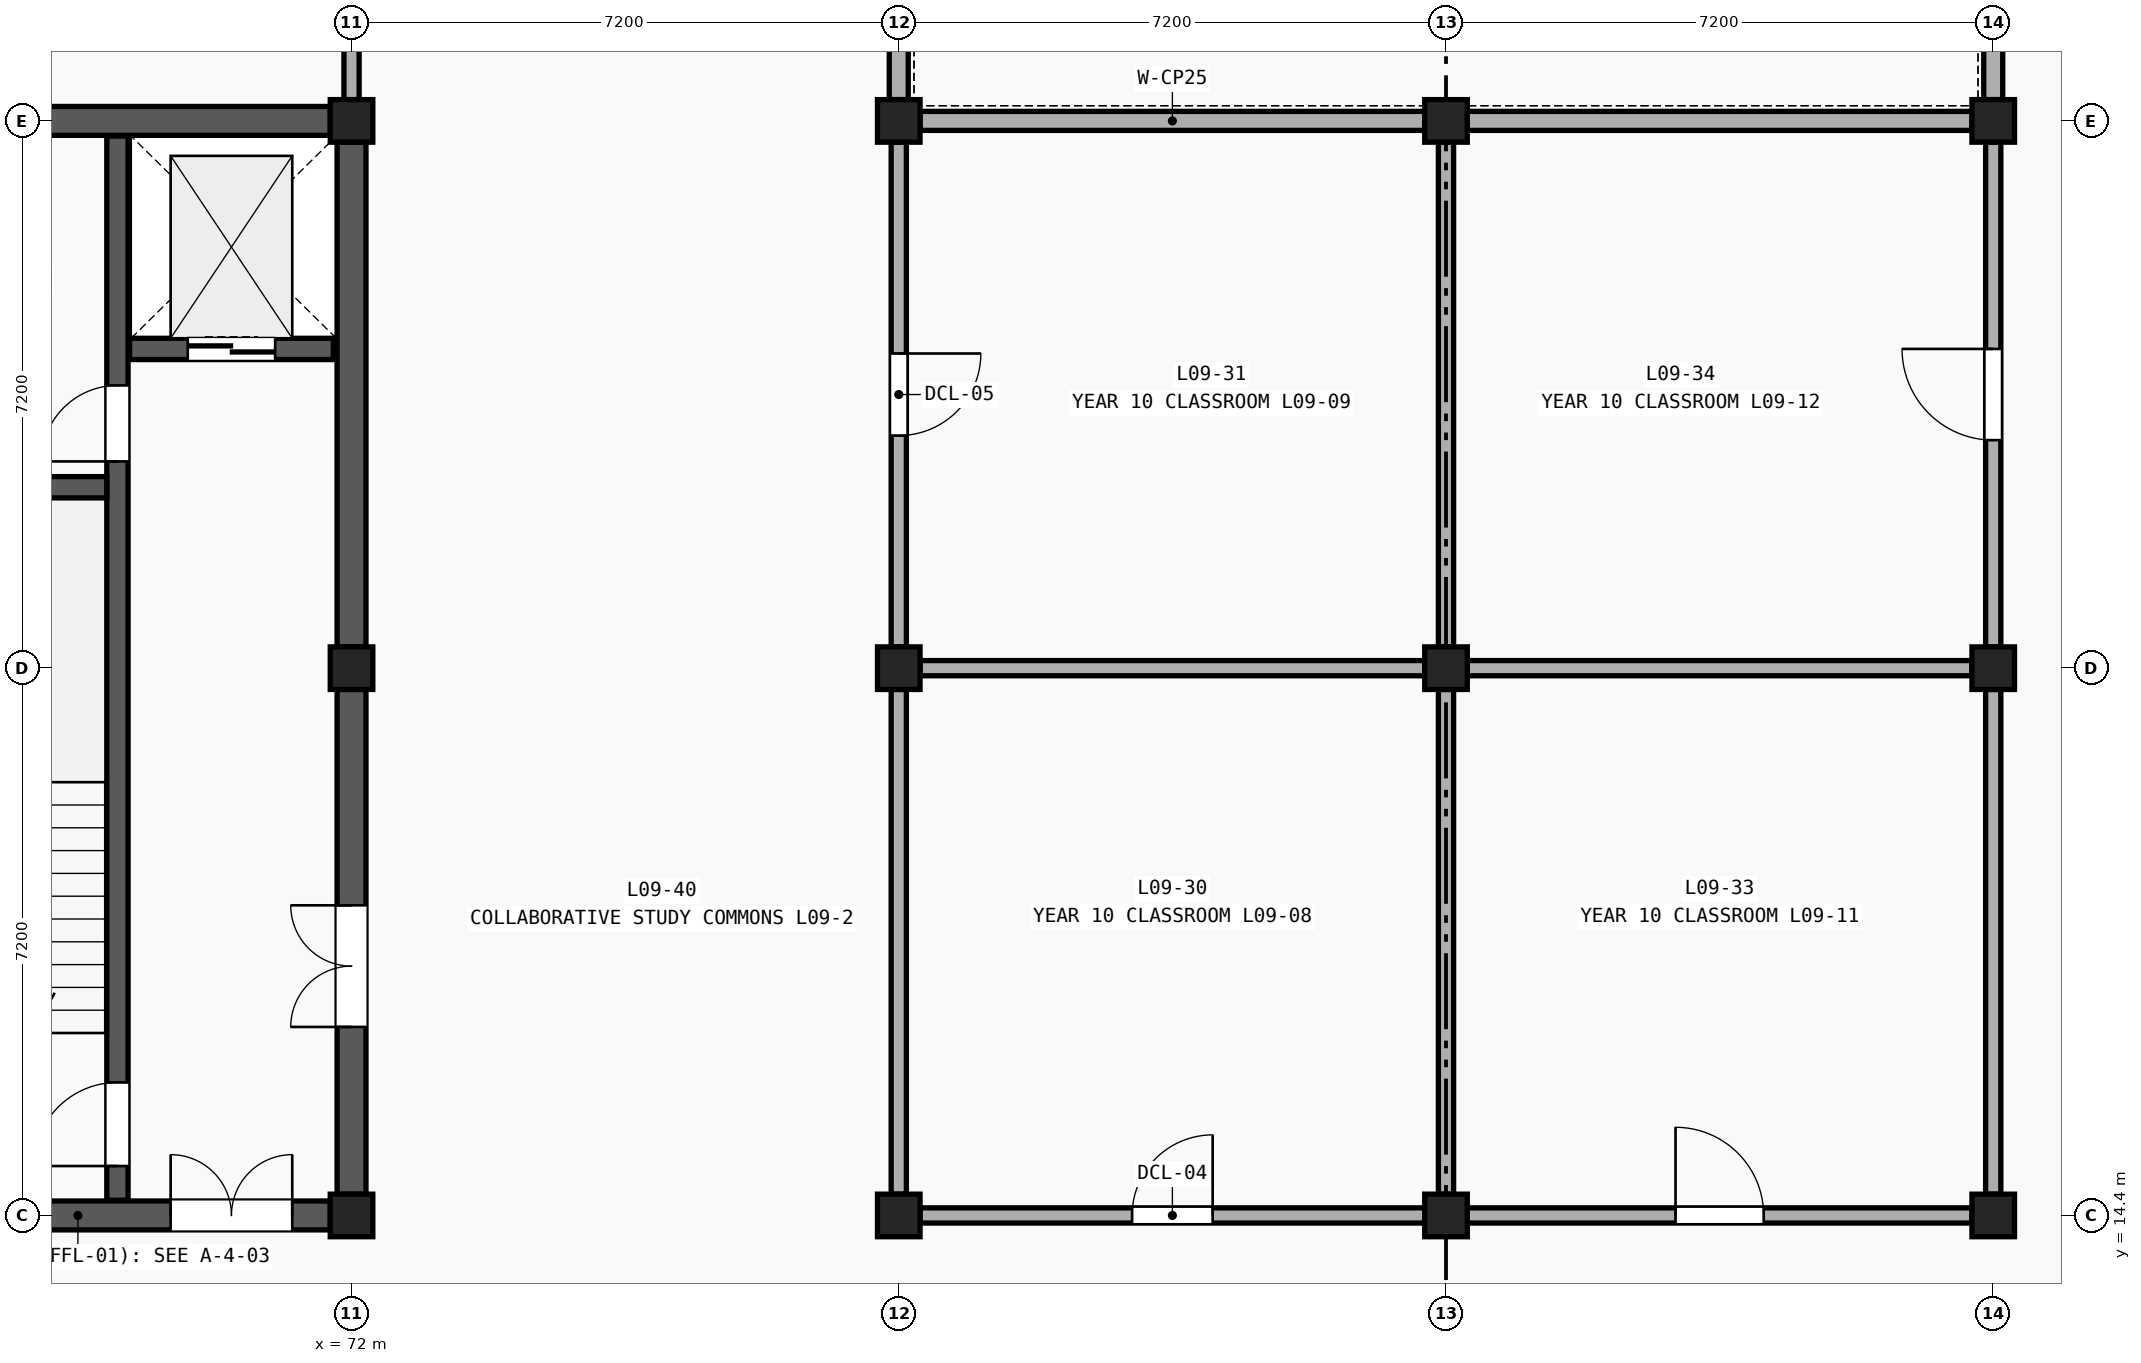
"""IFC4 building model, lengths in metres.
Left out: names, types, materials, properties, quantities, classifications, styles, units other than length and angle.
Written with IfcOpenShell. Run it as: python <this file> out.ifc"""

import sys

from ifc_helpers import new_model, si_unit, direction, frame, frame_2d, origin, origin_2d, place, context, subcontext, project, spatial, rectangle, extrude, element, fill, save


model = new_model("IFC4")
c1 = context("Model", 3, precision=1e-05, world=origin(), true_north=direction((0.0, 1.0)))
c2 = subcontext(c1, "Body", "Model", "MODEL_VIEW")
j1 = project(units=[si_unit("LENGTHUNIT", "METRE"), si_unit("PLANEANGLEUNIT", "RADIAN")], contexts=[c1])
p1 = place(None, origin())
s1 = spatial("IfcSite", under=j1, at=p1, CompositionType="ELEMENT")
p2 = place(p1, origin())
s2 = spatial("IfcBuilding", under=s1, at=p2, CompositionType="ELEMENT")
p3 = place(p2, frame((0.0, 0.0, 38.8)))
s3 = spatial("IfcBuildingStorey", under=s2, at=p3, CompositionType="ELEMENT", Elevation=38.8)
for number, where, z_axis, x_axis in (
    (1, (72.0, 14.4, 0.0), (0.0, 0.0, 1.0), (1.0, 0.0, 0.0)),
    (2, (72.0, 21.6, 0.0), (0.0, 0.0, 1.0), (1.0, 0.0, 0.0)),
    (3, (72.0, 28.8, 0.0), (0.0, 0.0, 1.0), (1.0, 0.0, 0.0)),
    (4, (79.2, 14.4, 0.0), (0.0, 0.0, 1.0), (1.0, 0.0, 0.0)),
    (5, (79.2, 21.6, 0.0), (0.0, 0.0, 1.0), (1.0, 0.0, 0.0)),
    (6, (79.2, 28.8, 0.0), (0.0, 0.0, 1.0), (1.0, 0.0, 0.0)),
    (7, (86.4, 14.4, 0.0), (0.0, 0.0, 1.0), (1.0, 0.0, 0.0)),
    (8, (86.4, 21.6, 0.0), (0.0, 0.0, 1.0), (1.0, 0.0, 0.0)),
    (9, (86.4, 28.8, 0.0), (0.0, 0.0, 1.0), (1.0, 0.0, 0.0)),
    (10, (93.6, 14.4, 0.0), (0.0, 0.0, 1.0), (1.0, 0.0, 0.0)),
    (11, (93.6, 21.6, 0.0), (0.0, 0.0, 1.0), (1.0, 0.0, 0.0)),
    (12, (93.6, 28.8, 0.0), (0.0, 0.0, 1.0), (1.0, 0.0, 0.0)),
):
    element("IfcColumn", number, at=place(p3, frame(where, z_axis=z_axis, x_axis=x_axis)), inside=s3, PredefinedType="COLUMN", context=c2, shape_type="SweptSolid", body=[
        extrude(rectangle(XDim=0.56, YDim=0.56, at=origin_2d()), origin(), (0.0, 0.0, 1.0), 4.0),
    ])
p4 = place(p3, frame((72.0, 14.68, 0.0), z_axis=(0.0, 0.0, 1.0), x_axis=(0.0, 1.0, 0.0)))
e13 = element("IfcWall", 13, at=p4, inside=s3, PredefinedType="SHEAR", context=c2, shape_type="SweptSolid", body=[
    extrude(rectangle(XDim=6.64, YDim=0.38, at=frame_2d((3.32, 0.0))), origin(), (0.0, 0.0, 1.0), 3.01),
])
p5 = place(p4, frame((2.2, 0.0, 0.0)))
e14 = element("IfcOpeningElement", 14, at=p5, cuts=e13, PredefinedType="OPENING", context=c2, shape_type="SweptSolid", body=[
    extrude(rectangle(XDim=1.6, YDim=2.2, at=frame_2d((0.8, 1.1))), frame((0.0, 0.202, 0.0), z_axis=(0.0, -1.0, 0.0), x_axis=(1.0, 0.0, 0.0)), (0.0, 0.0, 1.0), 0.404),
])
p6 = place(p3, frame((72.0, 21.88, 0.0), z_axis=(0.0, 0.0, 1.0), x_axis=(0.0, 1.0, 0.0)))
e15 = element("IfcWall", 15, at=p6, inside=s3, PredefinedType="SHEAR", context=c2, shape_type="SweptSolid", body=[
    extrude(rectangle(XDim=6.64, YDim=0.38, at=frame_2d((3.32, 0.0))), origin(), (0.0, 0.0, 1.0), 3.01),
])
p7 = place(p3, frame((65.08, 14.4, 0.0), z_axis=(0.0, 0.0, 1.0), x_axis=(1.0, 0.0, 0.0)))
e16 = element("IfcWall", 16, at=p7, inside=s3, PredefinedType="SHEAR", context=c2, shape_type="SweptSolid", body=[
    extrude(rectangle(XDim=6.64, YDim=0.38, at=frame_2d((3.32, 0.0))), origin(), (0.0, 0.0, 1.0), 3.01),
])
p8 = place(p7, frame((4.54, 0.0, 0.0)))
e17 = element("IfcOpeningElement", 17, at=p8, cuts=e16, PredefinedType="OPENING", context=c2, shape_type="SweptSolid", body=[
    extrude(rectangle(XDim=1.6, YDim=2.2, at=frame_2d((0.8, 1.1))), frame((0.0, 0.202, 0.0), z_axis=(0.0, -1.0, 0.0), x_axis=(1.0, 0.0, 0.0)), (0.0, 0.0, 1.0), 0.404),
])
p9 = place(p3, frame((65.08, 28.8, 0.0), z_axis=(0.0, 0.0, 1.0), x_axis=(1.0, 0.0, 0.0)))
e18 = element("IfcWall", 18, at=p9, inside=s3, PredefinedType="SHEAR", context=c2, shape_type="SweptSolid", body=[
    extrude(rectangle(XDim=6.64, YDim=0.38, at=frame_2d((3.32, 0.0))), origin(), (0.0, 0.0, 1.0), 3.01),
])
p10 = place(p3, frame((68.92, 14.6, 0.0), z_axis=(0.0, 0.0, 1.0), x_axis=(0.0, 1.0, 0.0)))
e19 = element("IfcWall", 19, at=p10, inside=s3, PredefinedType="SHEAR", context=c2, shape_type="SweptSolid", body=[
    extrude(rectangle(XDim=14.0, YDim=0.28, at=frame_2d((7.0, 0.0))), origin(), (0.0, 0.0, 1.0), 3.74),
])
p11 = place(p10, frame((0.45, 0.0, 0.0)))
e20 = element("IfcOpeningElement", 20, at=p11, cuts=e19, PredefinedType="OPENING", context=c2, shape_type="SweptSolid", body=[
    extrude(rectangle(XDim=1.1, YDim=2.15, at=frame_2d((0.55, 1.075))), frame((0.0, 0.152, 0.0), z_axis=(0.0, -1.0, 0.0), x_axis=(1.0, 0.0, 0.0)), (0.0, 0.0, 1.0), 0.304),
])
p12 = place(p10, frame((9.72, 0.0, 0.0)))
e21 = element("IfcOpeningElement", 21, at=p12, cuts=e19, PredefinedType="OPENING", context=c2, shape_type="SweptSolid", body=[
    extrude(rectangle(XDim=1.0, YDim=2.15, at=frame_2d((0.5, 1.075))), frame((0.0, 0.152, 0.0), z_axis=(0.0, -1.0, 0.0), x_axis=(1.0, 0.0, 0.0)), (0.0, 0.0, 1.0), 0.304),
])
p13 = place(p3, frame((65.0, 23.98, 0.0), z_axis=(0.0, 0.0, 1.0), x_axis=(1.0, 0.0, 0.0)))
e22 = element("IfcWall", 22, at=p13, inside=s3, PredefinedType="SHEAR", context=c2, shape_type="SweptSolid", body=[
    extrude(rectangle(XDim=3.78, YDim=0.28, at=frame_2d((1.89, 0.0))), origin(), (0.0, 0.0, 1.0), 3.74),
])
p14 = place(p3, frame((69.08, 25.8, 0.0), z_axis=(0.0, 0.0, 1.0), x_axis=(1.0, 0.0, 0.0)))
e23 = element("IfcWall", 23, at=p14, inside=s3, PredefinedType="SHEAR", context=c2, shape_type="SweptSolid", body=[
    extrude(rectangle(XDim=2.68, YDim=0.28, at=frame_2d((1.34, 0.0))), origin(), (0.0, 0.0, 1.0), 3.74),
])
p15 = place(p14, frame((0.765, 0.0, 0.0)))
e24 = element("IfcOpeningElement", 24, at=p15, cuts=e23, PredefinedType="OPENING", context=c2, shape_type="SweptSolid", body=[
    extrude(rectangle(XDim=1.15, YDim=2.2, at=frame_2d((0.575, 1.1))), frame((0.0, 0.152, 0.0), z_axis=(0.0, -1.0, 0.0), x_axis=(1.0, 0.0, 0.0)), (0.0, 0.0, 1.0), 0.304),
])
p16 = place(p3, frame((79.48, 28.8, 0.0), z_axis=(0.0, 0.0, 1.0), x_axis=(1.0, 0.0, 0.0)))
e25 = element("IfcWall", 25, at=p16, inside=s3, PredefinedType="PARTITIONING", context=c2, shape_type="SweptSolid", body=[
    extrude(rectangle(XDim=6.64, YDim=0.25, at=frame_2d((3.32, 0.0))), origin(), (0.0, 0.0, 1.0), 3.01),
])
p17 = place(p3, frame((79.2, 29.08, 0.0), z_axis=(0.0, 0.0, 1.0), x_axis=(0.0, 1.0, 0.0)))
e26 = element("IfcWall", 26, at=p17, inside=s3, PredefinedType="PARTITIONING", context=c2, shape_type="SweptSolid", body=[
    extrude(rectangle(XDim=6.64, YDim=0.25, at=frame_2d((3.32, 0.0))), origin(), (0.0, 0.0, 1.0), 3.01),
])
p18 = place(p17, frame((2.37, 0.0, 0.0)))
e27 = element("IfcOpeningElement", 27, at=p18, cuts=e26, PredefinedType="OPENING", context=c2, shape_type="SweptSolid", body=[
    extrude(rectangle(XDim=1.9, YDim=2.35, at=frame_2d((0.95, 1.175))), frame((0.0, 0.137, 0.0), z_axis=(0.0, -1.0, 0.0), x_axis=(1.0, 0.0, 0.0)), (0.0, 0.0, 1.0), 0.274),
])
p19 = place(p3, frame((86.68, 28.8, 0.0), z_axis=(0.0, 0.0, 1.0), x_axis=(1.0, 0.0, 0.0)))
e28 = element("IfcWall", 28, at=p19, inside=s3, PredefinedType="PARTITIONING", context=c2, shape_type="SweptSolid", body=[
    extrude(rectangle(XDim=6.64, YDim=0.25, at=frame_2d((3.32, 0.0))), origin(), (0.0, 0.0, 1.0), 3.01),
])
p20 = place(p3, frame((93.6, 29.08, 0.0), z_axis=(0.0, 0.0, 1.0), x_axis=(0.0, 1.0, 0.0)))
e29 = element("IfcWall", 29, at=p20, inside=s3, PredefinedType="PARTITIONING", context=c2, shape_type="SweptSolid", body=[
    extrude(rectangle(XDim=6.64, YDim=0.25, at=frame_2d((3.32, 0.0))), origin(), (0.0, 0.0, 1.0), 3.01),
])
p21 = place(p3, frame((72.0, 29.08, 0.0), z_axis=(0.0, 0.0, 1.0), x_axis=(0.0, 1.0, 0.0)))
e30 = element("IfcWall", 30, at=p21, inside=s3, PredefinedType="PARTITIONING", context=c2, shape_type="SweptSolid", body=[
    extrude(rectangle(XDim=6.64, YDim=0.2, at=frame_2d((3.32, 0.0))), origin(), (0.0, 0.0, 1.0), 3.01),
])
p22 = place(p21, frame((2.82, 0.0, 0.0)))
e31 = element("IfcOpeningElement", 31, at=p22, cuts=e30, PredefinedType="OPENING", context=c2, shape_type="SweptSolid", body=[
    extrude(rectangle(XDim=1.0, YDim=2.1, at=frame_2d((0.5, 1.05))), frame((0.0, 0.112, 0.0), z_axis=(0.0, -1.0, 0.0), x_axis=(1.0, 0.0, 0.0)), (0.0, 0.0, 1.0), 0.224),
])
p23 = place(p3, frame((79.48, 14.4, 0.0), z_axis=(0.0, 0.0, 1.0), x_axis=(1.0, 0.0, 0.0)))
e32 = element("IfcWall", 32, at=p23, inside=s3, PredefinedType="PARTITIONING", context=c2, shape_type="SweptSolid", body=[
    extrude(rectangle(XDim=6.64, YDim=0.2, at=frame_2d((3.32, 0.0))), origin(), (0.0, 0.0, 1.0), 3.01),
])
p24 = place(p23, frame((2.79, 0.0, 0.0)))
e33 = element("IfcOpeningElement", 33, at=p24, cuts=e32, PredefinedType="OPENING", context=c2, shape_type="SweptSolid", body=[
    extrude(rectangle(XDim=1.06, YDim=2.16, at=frame_2d((0.53, 1.08))), frame((0.0, 0.112, 0.0), z_axis=(0.0, -1.0, 0.0), x_axis=(1.0, 0.0, 0.0)), (0.0, 0.0, 1.0), 0.224),
])
for number, where, z_axis, x_axis in (
    (34, (79.48, 21.6, 0.0), (0.0, 0.0, 1.0), (1.0, 0.0, 0.0)),
    (35, (79.2, 14.68, 0.0), (0.0, 0.0, 1.0), (0.0, 1.0, 0.0)),
    (36, (86.4, 14.68, 0.0), (0.0, 0.0, 1.0), (0.0, 1.0, 0.0)),
):
    element("IfcWall", number, at=place(p3, frame(where, z_axis=z_axis, x_axis=x_axis)), inside=s3, PredefinedType="PARTITIONING", context=c2, shape_type="SweptSolid", body=[
        extrude(rectangle(XDim=6.64, YDim=0.2, at=frame_2d((3.32, 0.0))), origin(), (0.0, 0.0, 1.0), 3.01),
    ])
p25 = place(p3, frame((79.2, 21.88, 0.0), z_axis=(0.0, 0.0, 1.0), x_axis=(0.0, 1.0, 0.0)))
e37 = element("IfcWall", 37, at=p25, inside=s3, PredefinedType="PARTITIONING", context=c2, shape_type="SweptSolid", body=[
    extrude(rectangle(XDim=6.64, YDim=0.2, at=frame_2d((3.32, 0.0))), origin(), (0.0, 0.0, 1.0), 3.01),
])
p26 = place(p25, frame((2.78, 0.0, 0.0)))
e38 = element("IfcOpeningElement", 38, at=p26, cuts=e37, PredefinedType="OPENING", context=c2, shape_type="SweptSolid", body=[
    extrude(rectangle(XDim=1.08, YDim=2.18, at=frame_2d((0.54, 1.09))), frame((0.0, 0.112, 0.0), z_axis=(0.0, -1.0, 0.0), x_axis=(1.0, 0.0, 0.0)), (0.0, 0.0, 1.0), 0.224),
])
p27 = place(p3, frame((86.4, 21.88, 0.0), z_axis=(0.0, 0.0, 1.0), x_axis=(0.0, 1.0, 0.0)))
e39 = element("IfcWall", 39, at=p27, inside=s3, PredefinedType="PARTITIONING", context=c2, shape_type="SweptSolid", body=[
    extrude(rectangle(XDim=6.64, YDim=0.2, at=frame_2d((3.32, 0.0))), origin(), (0.0, 0.0, 1.0), 3.01),
])
p28 = place(p3, frame((86.68, 14.4, 0.0), z_axis=(0.0, 0.0, 1.0), x_axis=(1.0, 0.0, 0.0)))
e40 = element("IfcWall", 40, at=p28, inside=s3, PredefinedType="PARTITIONING", context=c2, shape_type="SweptSolid", body=[
    extrude(rectangle(XDim=6.64, YDim=0.2, at=frame_2d((3.32, 0.0))), origin(), (0.0, 0.0, 1.0), 3.01),
])
p29 = place(p28, frame((2.74, 0.0, 0.0)))
e41 = element("IfcOpeningElement", 41, at=p29, cuts=e40, PredefinedType="OPENING", context=c2, shape_type="SweptSolid", body=[
    extrude(rectangle(XDim=1.16, YDim=2.22, at=frame_2d((0.58, 1.11))), frame((0.0, 0.112, 0.0), z_axis=(0.0, -1.0, 0.0), x_axis=(1.0, 0.0, 0.0)), (0.0, 0.0, 1.0), 0.224),
])
for number, where, z_axis, x_axis in (
    (42, (86.68, 21.6, 0.0), (0.0, 0.0, 1.0), (1.0, 0.0, 0.0)),
    (43, (93.6, 14.68, 0.0), (0.0, 0.0, 1.0), (0.0, 1.0, 0.0)),
):
    element("IfcWall", number, at=place(p3, frame(where, z_axis=z_axis, x_axis=x_axis)), inside=s3, PredefinedType="PARTITIONING", context=c2, shape_type="SweptSolid", body=[
        extrude(rectangle(XDim=6.64, YDim=0.2, at=frame_2d((3.32, 0.0))), origin(), (0.0, 0.0, 1.0), 3.01),
    ])
p30 = place(p3, frame((93.6, 21.88, 0.0), z_axis=(0.0, 0.0, 1.0), x_axis=(0.0, 1.0, 0.0)))
e44 = element("IfcWall", 44, at=p30, inside=s3, PredefinedType="PARTITIONING", context=c2, shape_type="SweptSolid", body=[
    extrude(rectangle(XDim=6.64, YDim=0.2, at=frame_2d((3.32, 0.0))), origin(), (0.0, 0.0, 1.0), 3.01),
])
p31 = place(p30, frame((2.72, 0.0, 0.0)))
e45 = element("IfcOpeningElement", 45, at=p31, cuts=e44, PredefinedType="OPENING", context=c2, shape_type="SweptSolid", body=[
    extrude(rectangle(XDim=1.2, YDim=2.24, at=frame_2d((0.6, 1.12))), frame((0.0, 0.112, 0.0), z_axis=(0.0, -1.0, 0.0), x_axis=(1.0, 0.0, 0.0)), (0.0, 0.0, 1.0), 0.224),
])
p32 = place(p5, origin())
e46 = element("IfcDoor", 46, at=p32, inside=s3, OperationType="DOUBLE_DOOR_SINGLE_SWING", PredefinedType="DOOR", context=c2, shape_type="SweptSolid", body=[
    extrude(rectangle(XDim=1.6, YDim=2.2, at=frame_2d((0.8, 1.1))), frame((0.0, 0.025, 0.0), z_axis=(0.0, -1.0, 0.0), x_axis=(1.0, 0.0, 0.0)), (0.0, 0.0, 1.0), 0.05),
])
fill(e14, e46)
p33 = place(p8, origin())
e47 = element("IfcDoor", 47, at=p33, inside=s3, OperationType="DOUBLE_DOOR_SINGLE_SWING", PredefinedType="DOOR", context=c2, shape_type="SweptSolid", body=[
    extrude(rectangle(XDim=1.6, YDim=2.2, at=frame_2d((0.8, 1.1))), frame((0.0, 0.025, 0.0), z_axis=(0.0, -1.0, 0.0), x_axis=(1.0, 0.0, 0.0)), (0.0, 0.0, 1.0), 0.05),
])
fill(e17, e47)
p34 = place(p11, origin())
e48 = element("IfcDoor", 48, at=p34, inside=s3, OperationType="SINGLE_SWING_LEFT", PredefinedType="DOOR", context=c2, shape_type="SweptSolid", body=[
    extrude(rectangle(XDim=1.1, YDim=2.15, at=frame_2d((0.55, 1.075))), frame((0.0, 0.025, 0.0), z_axis=(0.0, -1.0, 0.0), x_axis=(1.0, 0.0, 0.0)), (0.0, 0.0, 1.0), 0.05),
])
fill(e20, e48)
p35 = place(p12, origin())
e49 = element("IfcDoor", 49, at=p35, inside=s3, OperationType="SINGLE_SWING_LEFT", PredefinedType="DOOR", context=c2, shape_type="SweptSolid", body=[
    extrude(rectangle(XDim=1.0, YDim=2.15, at=frame_2d((0.5, 1.075))), frame((0.0, 0.025, 0.0), z_axis=(0.0, -1.0, 0.0), x_axis=(1.0, 0.0, 0.0)), (0.0, 0.0, 1.0), 0.05),
])
fill(e21, e49)
p36 = place(p15, frame((1.15, 0.0, 0.0), z_axis=(0.0, 0.0, 1.0), x_axis=(-1.0, 0.0, 0.0)))
e50 = element("IfcDoor", 50, at=p36, inside=s3, OperationType="DOUBLE_DOOR_SLIDING", PredefinedType="DOOR", context=c2, shape_type="SweptSolid", body=[
    extrude(rectangle(XDim=1.15, YDim=2.2, at=frame_2d((0.575, 1.1))), frame((0.0, 0.025, 0.0), z_axis=(0.0, -1.0, 0.0), x_axis=(1.0, 0.0, 0.0)), (0.0, 0.0, 1.0), 0.05),
])
fill(e24, e50)
p37 = place(p24, origin())
e51 = element("IfcDoor", 51, at=p37, inside=s3, OperationType="SINGLE_SWING_RIGHT", PredefinedType="DOOR", context=c2, shape_type="SweptSolid", body=[
    extrude(rectangle(XDim=1.06, YDim=2.16, at=frame_2d((0.53, 1.08))), frame((0.0, 0.025, 0.0), z_axis=(0.0, -1.0, 0.0), x_axis=(1.0, 0.0, 0.0)), (0.0, 0.0, 1.0), 0.05),
])
fill(e33, e51)
p38 = place(p26, frame((1.08, 0.0, 0.0), z_axis=(0.0, 0.0, 1.0), x_axis=(-1.0, 0.0, 0.0)))
e52 = element("IfcDoor", 52, at=p38, inside=s3, OperationType="SINGLE_SWING_LEFT", PredefinedType="DOOR", context=c2, shape_type="SweptSolid", body=[
    extrude(rectangle(XDim=1.08, YDim=2.18, at=frame_2d((0.54, 1.09))), frame((0.0, 0.025, 0.0), z_axis=(0.0, -1.0, 0.0), x_axis=(1.0, 0.0, 0.0)), (0.0, 0.0, 1.0), 0.05),
])
fill(e38, e52)
p39 = place(p29, origin())
e53 = element("IfcDoor", 53, at=p39, inside=s3, OperationType="SINGLE_SWING_LEFT", PredefinedType="DOOR", context=c2, shape_type="SweptSolid", body=[
    extrude(rectangle(XDim=1.16, YDim=2.22, at=frame_2d((0.58, 1.11))), frame((0.0, 0.025, 0.0), z_axis=(0.0, -1.0, 0.0), x_axis=(1.0, 0.0, 0.0)), (0.0, 0.0, 1.0), 0.05),
])
fill(e41, e53)
p40 = place(p31, origin())
e54 = element("IfcDoor", 54, at=p40, inside=s3, OperationType="SINGLE_SWING_RIGHT", PredefinedType="DOOR", context=c2, shape_type="SweptSolid", body=[
    extrude(rectangle(XDim=1.2, YDim=2.24, at=frame_2d((0.6, 1.12))), frame((0.0, 0.025, 0.0), z_axis=(0.0, -1.0, 0.0), x_axis=(1.0, 0.0, 0.0)), (0.0, 0.0, 1.0), 0.05),
])
fill(e45, e54)
save(model, sys.argv[1])
